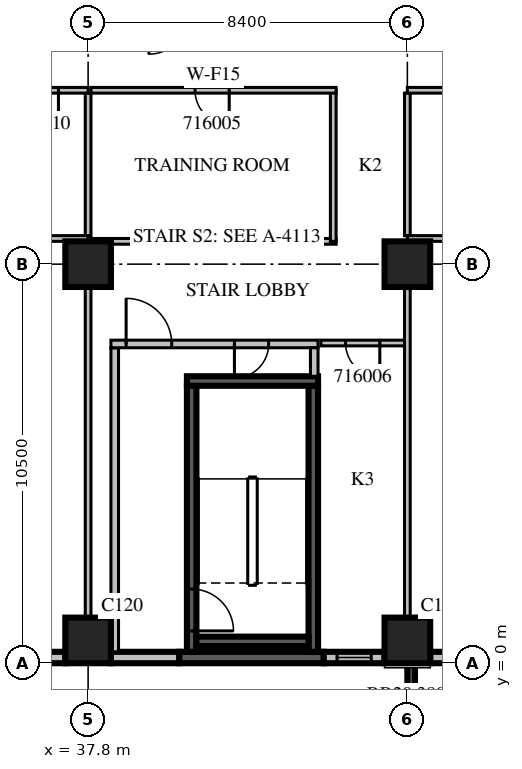
"""IFC4 building model, lengths in metres.
Left out: names, types, materials, properties, quantities, classifications, styles, units other than length and angle.
Written with IfcOpenShell. Run it as: python <this file> out.ifc"""

import sys

from ifc_helpers import new_model, si_unit, direction, frame, frame_2d, origin, origin_2d, place, context, subcontext, project, spatial, rectangle, extrude, source, transform, mapped, element, fill, save


model = new_model("IFC4")
c1 = context("Model", 3, precision=1e-05, world=origin(), true_north=direction((0.0, 1.0)))
c2 = subcontext(c1, "Body", "Model", "MODEL_VIEW")
j1 = project(units=[si_unit("LENGTHUNIT", "METRE"), si_unit("PLANEANGLEUNIT", "RADIAN")], contexts=[c1])
p1 = place(None, origin())
s1 = spatial("IfcSite", under=j1, at=p1, CompositionType="ELEMENT")
p2 = place(p1, origin())
s2 = spatial("IfcBuilding", under=s1, at=p2, CompositionType="ELEMENT")
p3 = place(p2, frame((0.0, 0.0, 78.3)))
s3 = spatial("IfcBuildingStorey", under=s2, at=p3, CompositionType="ELEMENT", Elevation=78.3)
m1 = source(origin(), c2, "Body", "SweptSolid", [
    extrude(rectangle(XDim=1.2, YDim=1.2, at=origin_2d()), origin(), (0.0, 0.0, 1.0), 4.2),
])
for number, where, z_axis, x_axis in (
    (1, (37.8, 0.6, 0.0), (0.0, 0.0, 1.0), (1.0, 0.0, 0.0)),
    (2, (46.2, 0.6, 0.0), (0.0, 0.0, 1.0), (1.0, 0.0, 0.0)),
    (3, (37.8, 10.5, 0.0), (0.0, 0.0, 1.0), (1.0, 0.0, 0.0)),
    (4, (46.2, 10.5, 0.0), (0.0, 0.0, 1.0), (1.0, 0.0, 0.0)),
):
    element("IfcColumn", number, at=place(p3, frame(where, z_axis=z_axis, x_axis=x_axis)), inside=s3, PredefinedType="COLUMN", context=c2, shape_type="MappedRepresentation", body=[
        mapped(m1, transform((0.0, 0.0, 0.0), scale=1.0)),
    ])
m2 = source(origin(), c2, "Body", "SweptSolid", [
    extrude(rectangle(XDim=3.9, YDim=0.2, at=frame_2d((1.95, 0.0))), origin(), (0.0, 0.0, 1.0), 3.8),
])
p4 = place(p3, frame((46.3, 0.0, 0.0), z_axis=(0.0, 0.0, 1.0), x_axis=(0.0, -1.0, 0.0)))
e5 = element("IfcWall", 5, at=p4, inside=s3, PredefinedType="SOLIDWALL", context=c2, shape_type="MappedRepresentation", body=[
    mapped(m2, transform((0.0, 0.0, 0.0), scale=1.0)),
])
m3 = source(origin(), c2, "Body", "SweptSolid", [
    extrude(rectangle(XDim=2.4, YDim=2.7, at=frame_2d((1.2, 1.35))), frame((0.0, 0.11, 0.0), z_axis=(0.0, -1.0, 0.0), x_axis=(1.0, 0.0, 0.0)), (0.0, 0.0, 1.0), 0.22),
])
p5 = place(p4, frame((0.75, 0.0, 0.6)))
e6 = element("IfcOpeningElement", 6, at=p5, cuts=e5, PredefinedType="OPENING", context=c2, shape_type="MappedRepresentation", body=[
    mapped(m3, transform((0.0, 0.0, 0.0), scale=1.0)),
])
m4 = source(origin(), c2, "Body", "SweptSolid", [
    extrude(rectangle(XDim=7.2, YDim=0.3, at=frame_2d((3.6, 0.0))), origin(), (0.0, 0.0, 1.0), 3.8),
])
p6 = place(p3, frame((30.0, 0.15, 0.0), z_axis=(0.0, 0.0, 1.0), x_axis=(1.0, 0.0, 0.0)))
e7 = element("IfcWall", 7, at=p6, inside=s3, PredefinedType="STANDARD", context=c2, shape_type="MappedRepresentation", body=[
    mapped(m4, transform((0.0, 0.0, 0.0), scale=1.0)),
])
m5 = source(origin(), c2, "Body", "SweptSolid", [
    extrude(rectangle(XDim=2.4, YDim=2.7, at=frame_2d((1.2, 1.35))), frame((0.0, 0.16, 0.0), z_axis=(0.0, -1.0, 0.0), x_axis=(1.0, 0.0, 0.0)), (0.0, 0.0, 1.0), 0.32),
])
p7 = place(p6, frame((2.5, 0.0, 0.6)))
e8 = element("IfcOpeningElement", 8, at=p7, cuts=e7, PredefinedType="OPENING", context=c2, shape_type="MappedRepresentation", body=[
    mapped(m5, transform((0.0, 0.0, 0.0), scale=1.0)),
])
m6 = source(origin(), c2, "Body", "SweptSolid", [
    extrude(rectangle(XDim=1.8, YDim=0.3, at=frame_2d((0.9, 0.0))), origin(), (0.0, 0.0, 1.0), 3.8),
])
p8 = place(p3, frame((38.4, 0.15, 0.0), z_axis=(0.0, 0.0, 1.0), x_axis=(1.0, 0.0, 0.0)))
e9 = element("IfcWall", 9, at=p8, inside=s3, PredefinedType="STANDARD", context=c2, shape_type="MappedRepresentation", body=[
    mapped(m6, transform((0.0, 0.0, 0.0), scale=1.0)),
])
m7 = source(origin(), c2, "Body", "SweptSolid", [
    extrude(rectangle(XDim=3.8, YDim=0.3, at=frame_2d((1.9, 0.0))), origin(), (0.0, 0.0, 1.0), 3.8),
])
p9 = place(p3, frame((40.2, 0.15, 0.0), z_axis=(0.0, 0.0, 1.0), x_axis=(1.0, 0.0, 0.0)))
e10 = element("IfcWall", 10, at=p9, inside=s3, PredefinedType="SOLIDWALL", context=c2, shape_type="MappedRepresentation", body=[
    mapped(m7, transform((0.0, 0.0, 0.0), scale=1.0)),
])
m8 = source(origin(), c2, "Body", "SweptSolid", [
    extrude(rectangle(XDim=1.6, YDim=0.3, at=frame_2d((0.8, 0.0))), origin(), (0.0, 0.0, 1.0), 3.8),
])
p10 = place(p3, frame((44.0, 0.15, 0.0), z_axis=(0.0, 0.0, 1.0), x_axis=(1.0, 0.0, 0.0)))
e11 = element("IfcWall", 11, at=p10, inside=s3, PredefinedType="STANDARD", context=c2, shape_type="MappedRepresentation", body=[
    mapped(m8, transform((0.0, 0.0, 0.0), scale=1.0)),
])
m9 = source(origin(), c2, "Body", "SweptSolid", [
    extrude(rectangle(XDim=0.9, YDim=2.7, at=frame_2d((0.45, 1.35))), frame((0.0, 0.16, 0.0), z_axis=(0.0, -1.0, 0.0), x_axis=(1.0, 0.0, 0.0)), (0.0, 0.0, 1.0), 0.32),
])
p11 = place(p10, frame((0.35, 0.0, 0.6)))
e12 = element("IfcOpeningElement", 12, at=p11, cuts=e11, PredefinedType="OPENING", context=c2, shape_type="MappedRepresentation", body=[
    mapped(m9, transform((0.0, 0.0, 0.0), scale=1.0)),
])
m10 = source(origin(), c2, "Body", "SweptSolid", [
    extrude(rectangle(XDim=4.68, YDim=0.3, at=frame_2d((2.34, 0.0))), origin(), (0.0, 0.0, 1.0), 3.8),
])
p12 = place(p3, frame((46.8, 0.15, 0.0), z_axis=(0.0, 0.0, 1.0), x_axis=(1.0, 0.0, 0.0)))
e13 = element("IfcWall", 13, at=p12, inside=s3, PredefinedType="STANDARD", context=c2, shape_type="MappedRepresentation", body=[
    mapped(m10, transform((0.0, 0.0, 0.0), scale=1.0)),
])
m11 = source(origin(), c2, "Body", "SweptSolid", [
    extrude(rectangle(XDim=1.0, YDim=2.1, at=frame_2d((0.5, 1.05))), frame((0.0, 0.16, 0.0), z_axis=(0.0, -1.0, 0.0), x_axis=(1.0, 0.0, 0.0)), (0.0, 0.0, 1.0), 0.32),
])
p13 = place(p12, frame((1.84, 0.0, 0.0)))
e14 = element("IfcOpeningElement", 14, at=p13, cuts=e13, PredefinedType="OPENING", context=c2, shape_type="MappedRepresentation", body=[
    mapped(m11, transform((0.0, 0.0, 0.0), scale=1.0)),
])
m12 = source(origin(), c2, "Body", "SweptSolid", [
    extrude(rectangle(XDim=7.0, YDim=0.25, at=frame_2d((3.5, 0.0))), origin(), (0.0, 0.0, 1.0), 3.8),
])
p14 = place(p3, frame((40.525, 0.3, 0.0), z_axis=(0.0, 0.0, 1.0), x_axis=(0.0, 1.0, 0.0)))
e15 = element("IfcWall", 15, at=p14, inside=s3, PredefinedType="SOLIDWALL", context=c2, shape_type="MappedRepresentation", body=[
    mapped(m12, transform((0.0, 0.0, 0.0), scale=1.0)),
])
m13 = source(origin(), c2, "Body", "SweptSolid", [
    extrude(rectangle(XDim=1.1, YDim=2.1, at=frame_2d((0.55, 1.05))), frame((0.0, 0.135, 0.0), z_axis=(0.0, -1.0, 0.0), x_axis=(1.0, 0.0, 0.0)), (0.0, 0.0, 1.0), 0.27),
])
p15 = place(p14, frame((0.55, 0.0, 0.0)))
e16 = element("IfcOpeningElement", 16, at=p15, cuts=e15, PredefinedType="OPENING", context=c2, shape_type="MappedRepresentation", body=[
    mapped(m13, transform((0.0, 0.0, 0.0), scale=1.0)),
])
p16 = place(p3, frame((43.725, 0.3, 0.0), z_axis=(0.0, 0.0, 1.0), x_axis=(0.0, 1.0, 0.0)))
e17 = element("IfcWall", 17, at=p16, inside=s3, PredefinedType="SOLIDWALL", context=c2, shape_type="MappedRepresentation", body=[
    mapped(m12, transform((0.0, 0.0, 0.0), scale=1.0)),
])
m14 = source(origin(), c2, "Body", "SweptSolid", [
    extrude(rectangle(XDim=3.45, YDim=0.25, at=frame_2d((1.725, 0.0))), origin(), (0.0, 0.0, 1.0), 3.8),
])
p17 = place(p3, frame((40.4, 7.425, 0.0), z_axis=(0.0, 0.0, 1.0), x_axis=(1.0, 0.0, 0.0)))
e18 = element("IfcWall", 18, at=p17, inside=s3, PredefinedType="SOLIDWALL", context=c2, shape_type="MappedRepresentation", body=[
    mapped(m14, transform((0.0, 0.0, 0.0), scale=1.0)),
])
m15 = source(origin(), c2, "Body", "SweptSolid", [
    extrude(rectangle(XDim=2.95, YDim=0.25, at=frame_2d((1.475, 0.0))), origin(), (0.0, 0.0, 1.0), 3.8),
])
p18 = place(p3, frame((40.65, 0.575, 0.0), z_axis=(0.0, 0.0, 1.0), x_axis=(1.0, 0.0, 0.0)))
e19 = element("IfcWall", 19, at=p18, inside=s3, PredefinedType="SOLIDWALL", context=c2, shape_type="MappedRepresentation", body=[
    mapped(m15, transform((0.0, 0.0, 0.0), scale=1.0)),
])
m16 = source(origin(), c2, "Body", "SweptSolid", [
    extrude(rectangle(XDim=8.0, YDim=0.2, at=frame_2d((4.0, 0.0))), origin(), (0.0, 0.0, 1.0), 3.8),
])
p19 = place(p3, frame((38.5, 0.3, 0.0), z_axis=(0.0, 0.0, 1.0), x_axis=(0.0, 1.0, 0.0)))
e20 = element("IfcWall", 20, at=p19, inside=s3, PredefinedType="PARTITIONING", context=c2, shape_type="MappedRepresentation", body=[
    mapped(m16, transform((0.0, 0.0, 0.0), scale=1.0)),
])
m17 = source(origin(), c2, "Body", "SweptSolid", [
    extrude(rectangle(XDim=5.45, YDim=0.2, at=frame_2d((2.725, 0.0))), origin(), (0.0, 0.0, 1.0), 3.8),
])
p20 = place(p3, frame((38.4, 8.4, 0.0), z_axis=(0.0, 0.0, 1.0), x_axis=(1.0, 0.0, 0.0)))
e21 = element("IfcWall", 21, at=p20, inside=s3, PredefinedType="PARTITIONING", context=c2, shape_type="MappedRepresentation", body=[
    mapped(m17, transform((0.0, 0.0, 0.0), scale=1.0)),
])
m18 = source(origin(), c2, "Body", "SweptSolid", [
    extrude(rectangle(XDim=1.2, YDim=2.1, at=frame_2d((0.6, 1.05))), frame((0.0, 0.11, 0.0), z_axis=(0.0, -1.0, 0.0), x_axis=(1.0, 0.0, 0.0)), (0.0, 0.0, 1.0), 0.22),
])
p21 = place(p20, frame((0.4, 0.0, 0.0)))
e22 = element("IfcOpeningElement", 22, at=p21, cuts=e21, PredefinedType="OPENING", context=c2, shape_type="MappedRepresentation", body=[
    mapped(m18, transform((0.0, 0.0, 0.0), scale=1.0)),
])
m19 = source(origin(), c2, "Body", "SweptSolid", [
    extrude(rectangle(XDim=0.9, YDim=2.1, at=frame_2d((0.45, 1.05))), frame((0.0, 0.11, 0.0), z_axis=(0.0, -1.0, 0.0), x_axis=(1.0, 0.0, 0.0)), (0.0, 0.0, 1.0), 0.22),
])
p22 = place(p20, frame((3.25, 0.0, 0.0)))
e23 = element("IfcOpeningElement", 23, at=p22, cuts=e21, PredefinedType="OPENING", context=c2, shape_type="MappedRepresentation", body=[
    mapped(m19, transform((0.0, 0.0, 0.0), scale=1.0)),
])
m20 = source(origin(), c2, "Body", "SweptSolid", [
    extrude(rectangle(XDim=0.75, YDim=0.2, at=frame_2d((0.375, 0.0))), origin(), (0.0, 0.0, 1.0), 3.8),
])
p23 = place(p3, frame((43.75, 7.55, 0.0), z_axis=(0.0, 0.0, 1.0), x_axis=(0.0, 1.0, 0.0)))
e24 = element("IfcWall", 24, at=p23, inside=s3, PredefinedType="PARTITIONING", context=c2, shape_type="MappedRepresentation", body=[
    mapped(m20, transform((0.0, 0.0, 0.0), scale=1.0)),
])
m21 = source(origin(), c2, "Body", "SweptSolid", [
    extrude(rectangle(XDim=6.45, YDim=0.15, at=frame_2d((3.225, 0.0))), origin(), (0.0, 0.0, 1.0), 3.8),
])
p24 = place(p3, frame((37.875, 11.1, 0.0), z_axis=(0.0, 0.0, 1.0), x_axis=(1.0, 0.0, 0.0)))
e25 = element("IfcWall", 25, at=p24, inside=s3, PredefinedType="PARTITIONING", context=c2, shape_type="MappedRepresentation", body=[
    mapped(m21, transform((0.0, 0.0, 0.0), scale=1.0)),
])
m22 = source(origin(), c2, "Body", "SweptSolid", [
    extrude(rectangle(XDim=3.975, YDim=0.15, at=frame_2d((1.988, 0.0))), origin(), (0.0, 0.0, 1.0), 3.8),
])
p25 = place(p3, frame((44.25, 11.1, 0.0), z_axis=(0.0, 0.0, 1.0), x_axis=(0.0, 1.0, 0.0)))
e26 = element("IfcWall", 26, at=p25, inside=s3, PredefinedType="PARTITIONING", context=c2, shape_type="MappedRepresentation", body=[
    mapped(m22, transform((0.0, 0.0, 0.0), scale=1.0)),
])
p26 = place(p3, frame((44.325, 15.075, 0.0), z_axis=(0.0, 0.0, 1.0), x_axis=(-1.0, 0.0, 0.0)))
e27 = element("IfcWall", 27, at=p26, inside=s3, PredefinedType="PARTITIONING", context=c2, shape_type="MappedRepresentation", body=[
    mapped(m21, transform((0.0, 0.0, 0.0), scale=1.0)),
])
m23 = source(origin(), c2, "Body", "SweptSolid", [
    extrude(rectangle(XDim=0.9, YDim=2.1, at=frame_2d((0.45, 1.05))), frame((0.0, 0.085, 0.0), z_axis=(0.0, -1.0, 0.0), x_axis=(1.0, 0.0, 0.0)), (0.0, 0.0, 1.0), 0.17),
])
p27 = place(p26, frame((2.812, 0.0, 0.0)))
e28 = element("IfcOpeningElement", 28, at=p27, cuts=e27, PredefinedType="OPENING", context=c2, shape_type="MappedRepresentation", body=[
    mapped(m23, transform((0.0, 0.0, 0.0), scale=1.0)),
])
m24 = source(origin(), c2, "Body", "SweptSolid", [
    extrude(rectangle(XDim=2.2, YDim=0.15, at=frame_2d((1.1, 0.0))), origin(), (0.0, 0.0, 1.0), 3.8),
])
p28 = place(p3, frame((46.125, 8.425, 0.0), z_axis=(0.0, 0.0, 1.0), x_axis=(-1.0, 0.0, 0.0)))
e29 = element("IfcWall", 29, at=p28, inside=s3, PredefinedType="PARTITIONING", context=c2, shape_type="MappedRepresentation", body=[
    mapped(m24, transform((0.0, 0.0, 0.0), scale=1.0)),
])
p29 = place(p28, frame((0.65, 0.0, 0.0)))
e30 = element("IfcOpeningElement", 30, at=p29, cuts=e29, PredefinedType="OPENING", context=c2, shape_type="MappedRepresentation", body=[
    mapped(m23, transform((0.0, 0.0, 0.0), scale=1.0)),
])
m25 = source(origin(), c2, "Body", "SweptSolid", [
    extrude(rectangle(XDim=8.702, YDim=0.15, at=frame_2d((4.351, 0.0))), origin(), (0.0, 0.0, 1.0), 3.8),
])
p30 = place(p3, frame((37.8, 1.199, 0.0), z_axis=(0.0, 0.0, 1.0), x_axis=(0.0, 1.0, 0.0)))
e31 = element("IfcWall", 31, at=p30, inside=s3, PredefinedType="PARTITIONING", context=c2, shape_type="MappedRepresentation", body=[
    mapped(m25, transform((0.0, 0.0, 0.0), scale=1.0)),
])
m26 = source(origin(), c2, "Body", "SweptSolid", [
    extrude(rectangle(XDim=3.75, YDim=0.15, at=frame_2d((1.875, 0.0))), origin(), (0.0, 0.0, 1.0), 3.8),
])
p31 = place(p3, frame((37.8, 11.25, 0.0), z_axis=(0.0, 0.0, 1.0), x_axis=(0.0, 1.0, 0.0)))
e32 = element("IfcWall", 32, at=p31, inside=s3, PredefinedType="PARTITIONING", context=c2, shape_type="MappedRepresentation", body=[
    mapped(m26, transform((0.0, 0.0, 0.0), scale=1.0)),
])
m27 = source(origin(), c2, "Body", "SweptSolid", [
    extrude(rectangle(XDim=8.4, YDim=0.15, at=frame_2d((4.2, 0.0))), origin(), (0.0, 0.0, 1.0), 3.8),
])
p32 = place(p3, frame((37.8, 11.175, 0.0), z_axis=(0.0, 0.0, 1.0), x_axis=(-1.0, 0.0, 0.0)))
e33 = element("IfcWall", 33, at=p32, inside=s3, PredefinedType="PARTITIONING", context=c2, shape_type="MappedRepresentation", body=[
    mapped(m27, transform((0.0, 0.0, 0.0), scale=1.0)),
])
m28 = source(origin(), c2, "Body", "SweptSolid", [
    extrude(rectangle(XDim=1.1, YDim=2.1, at=frame_2d((0.55, 1.05))), frame((0.0, 0.085, 0.0), z_axis=(0.0, -1.0, 0.0), x_axis=(1.0, 0.0, 0.0)), (0.0, 0.0, 1.0), 0.17),
])
p33 = place(p32, frame((5.833, 0.0, 0.0)))
e34 = element("IfcOpeningElement", 34, at=p33, cuts=e33, PredefinedType="OPENING", context=c2, shape_type="MappedRepresentation", body=[
    mapped(m28, transform((0.0, 0.0, 0.0), scale=1.0)),
])
p34 = place(p3, frame((46.2, 1.199, 0.0), z_axis=(0.0, 0.0, 1.0), x_axis=(0.0, 1.0, 0.0)))
e35 = element("IfcWall", 35, at=p34, inside=s3, PredefinedType="PARTITIONING", context=c2, shape_type="MappedRepresentation", body=[
    mapped(m25, transform((0.0, 0.0, 0.0), scale=1.0)),
])
p35 = place(p3, frame((46.2, 11.25, 0.0), z_axis=(0.0, 0.0, 1.0), x_axis=(0.0, 1.0, 0.0)))
e36 = element("IfcWall", 36, at=p35, inside=s3, PredefinedType="PARTITIONING", context=c2, shape_type="MappedRepresentation", body=[
    mapped(m26, transform((0.0, 0.0, 0.0), scale=1.0)),
])
m29 = source(origin(), c2, "Body", "SweptSolid", [
    extrude(rectangle(XDim=24.9, YDim=0.15, at=frame_2d((12.45, 0.0))), origin(), (0.0, 0.0, 1.0), 3.8),
])
p36 = place(p3, frame((71.1, 11.175, 0.0), z_axis=(0.0, 0.0, 1.0), x_axis=(-1.0, 0.0, 0.0)))
e37 = element("IfcWall", 37, at=p36, inside=s3, PredefinedType="PARTITIONING", context=c2, shape_type="MappedRepresentation", body=[
    mapped(m29, transform((0.0, 0.0, 0.0), scale=1.0)),
])
p37 = place(p36, frame((22.332, 0.0, 0.0)))
e38 = element("IfcOpeningElement", 38, at=p37, cuts=e37, PredefinedType="OPENING", context=c2, shape_type="MappedRepresentation", body=[
    mapped(m28, transform((0.0, 0.0, 0.0), scale=1.0)),
])
p38 = place(p36, frame((4.607, 0.0, 0.0)))
e39 = element("IfcOpeningElement", 39, at=p38, cuts=e37, PredefinedType="OPENING", context=c2, shape_type="MappedRepresentation", body=[
    mapped(m23, transform((0.0, 0.0, 0.0), scale=1.0)),
])
p39 = place(p36, frame((2.243, 0.0, 0.0)))
e40 = element("IfcOpeningElement", 40, at=p39, cuts=e37, PredefinedType="OPENING", context=c2, shape_type="MappedRepresentation", body=[
    mapped(m23, transform((0.0, 0.0, 0.0), scale=1.0)),
])
p40 = place(p3, frame((37.8, 15.075, 0.0), z_axis=(0.0, 0.0, 1.0), x_axis=(-1.0, 0.0, 0.0)))
e41 = element("IfcWall", 41, at=p40, inside=s3, PredefinedType="PARTITIONING", context=c2, shape_type="MappedRepresentation", body=[
    mapped(m27, transform((0.0, 0.0, 0.0), scale=1.0)),
])
p41 = place(p40, frame((6.146, 0.0, 0.0)))
e42 = element("IfcOpeningElement", 42, at=p41, cuts=e41, PredefinedType="OPENING", context=c2, shape_type="MappedRepresentation", body=[
    mapped(m28, transform((0.0, 0.0, 0.0), scale=1.0)),
])
p42 = place(p40, frame((3.276, 0.0, 0.0)))
e43 = element("IfcOpeningElement", 43, at=p42, cuts=e41, PredefinedType="OPENING", context=c2, shape_type="MappedRepresentation", body=[
    mapped(m23, transform((0.0, 0.0, 0.0), scale=1.0)),
])
p43 = place(p40, frame((0.781, 0.0, 0.0)))
e44 = element("IfcOpeningElement", 44, at=p43, cuts=e41, PredefinedType="OPENING", context=c2, shape_type="MappedRepresentation", body=[
    mapped(m23, transform((0.0, 0.0, 0.0), scale=1.0)),
])
p44 = place(p3, frame((71.1, 15.075, 0.0), z_axis=(0.0, 0.0, 1.0), x_axis=(-1.0, 0.0, 0.0)))
e45 = element("IfcWall", 45, at=p44, inside=s3, PredefinedType="PARTITIONING", context=c2, shape_type="MappedRepresentation", body=[
    mapped(m29, transform((0.0, 0.0, 0.0), scale=1.0)),
])
p45 = place(p44, frame((22.644, 0.0, 0.0)))
e46 = element("IfcOpeningElement", 46, at=p45, cuts=e45, PredefinedType="OPENING", context=c2, shape_type="MappedRepresentation", body=[
    mapped(m28, transform((0.0, 0.0, 0.0), scale=1.0)),
])
p46 = place(p44, frame((19.804, 0.0, 0.0)))
e47 = element("IfcOpeningElement", 47, at=p46, cuts=e45, PredefinedType="OPENING", context=c2, shape_type="MappedRepresentation", body=[
    mapped(m23, transform((0.0, 0.0, 0.0), scale=1.0)),
])
p47 = place(p44, frame((15.529, 0.0, 0.0)))
e48 = element("IfcOpeningElement", 48, at=p47, cuts=e45, PredefinedType="OPENING", context=c2, shape_type="MappedRepresentation", body=[
    mapped(m23, transform((0.0, 0.0, 0.0), scale=1.0)),
])
p48 = place(p44, frame((10.838, 0.0, 0.0)))
e49 = element("IfcOpeningElement", 49, at=p48, cuts=e45, PredefinedType="OPENING", context=c2, shape_type="MappedRepresentation", body=[
    mapped(m23, transform((0.0, 0.0, 0.0), scale=1.0)),
])
p49 = place(p44, frame((7.999, 0.0, 0.0)))
e50 = element("IfcOpeningElement", 50, at=p49, cuts=e45, PredefinedType="OPENING", context=c2, shape_type="MappedRepresentation", body=[
    mapped(m23, transform((0.0, 0.0, 0.0), scale=1.0)),
])
m30 = source(origin(), c2, "Body", "SweptSolid", [
    extrude(rectangle(XDim=1.2, YDim=2.1, at=frame_2d((0.6, 1.05))), frame((0.0, 0.085, 0.0), z_axis=(0.0, -1.0, 0.0), x_axis=(1.0, 0.0, 0.0)), (0.0, 0.0, 1.0), 0.17),
])
p50 = place(p44, frame((2.993, 0.0, 0.0)))
e51 = element("IfcOpeningElement", 51, at=p50, cuts=e45, PredefinedType="OPENING", context=c2, shape_type="MappedRepresentation", body=[
    mapped(m30, transform((0.0, 0.0, 0.0), scale=1.0)),
])
m31 = source(origin(), c2, "Body", "SweptSolid", [
    extrude(rectangle(XDim=0.9, YDim=2.7, at=frame_2d((0.45, 1.35))), frame((0.0, 0.03, 0.0), z_axis=(0.0, -1.0, 0.0), x_axis=(1.0, 0.0, 0.0)), (0.0, 0.0, 1.0), 0.06),
])
p51 = place(p11, origin())
e52 = element("IfcWindow", 52, at=p51, inside=s3, PartitioningType="SINGLE_PANEL", PredefinedType="WINDOW", context=c2, shape_type="MappedRepresentation", body=[
    mapped(m31, transform((0.0, 0.0, 0.0), scale=1.0)),
])
fill(e12, e52)
m32 = source(origin(), c2, "Body", "SweptSolid", [
    extrude(rectangle(XDim=1.1, YDim=2.1, at=frame_2d((0.55, 1.05))), frame((0.0, 0.025, 0.0), z_axis=(0.0, -1.0, 0.0), x_axis=(1.0, 0.0, 0.0)), (0.0, 0.0, 1.0), 0.05),
])
p52 = place(p15, origin())
e53 = element("IfcDoor", 53, at=p52, inside=s3, OperationType="SINGLE_SWING_RIGHT", PredefinedType="DOOR", context=c2, shape_type="MappedRepresentation", body=[
    mapped(m32, transform((0.0, 0.0, 0.0), scale=1.0)),
])
fill(e16, e53)
m33 = source(origin(), c2, "Body", "SweptSolid", [
    extrude(rectangle(XDim=1.2, YDim=2.1, at=frame_2d((0.6, 1.05))), frame((0.0, 0.025, 0.0), z_axis=(0.0, -1.0, 0.0), x_axis=(1.0, 0.0, 0.0)), (0.0, 0.0, 1.0), 0.05),
])
p53 = place(p21, origin())
e54 = element("IfcDoor", 54, at=p53, inside=s3, OperationType="SINGLE_SWING_LEFT", PredefinedType="DOOR", context=c2, shape_type="MappedRepresentation", body=[
    mapped(m33, transform((0.0, 0.0, 0.0), scale=1.0)),
])
fill(e22, e54)
m34 = source(origin(), c2, "Body", "SweptSolid", [
    extrude(rectangle(XDim=0.9, YDim=2.1, at=frame_2d((0.45, 1.05))), frame((0.0, 0.025, 0.0), z_axis=(0.0, -1.0, 0.0), x_axis=(1.0, 0.0, 0.0)), (0.0, 0.0, 1.0), 0.05),
])
p54 = place(p22, origin())
e55 = element("IfcDoor", 55, at=p54, inside=s3, OperationType="SINGLE_SWING_RIGHT", PredefinedType="DOOR", context=c2, shape_type="MappedRepresentation", body=[
    mapped(m34, transform((0.0, 0.0, 0.0), scale=1.0)),
])
fill(e23, e55)
p55 = place(p27, origin())
e56 = element("IfcDoor", 56, at=p55, inside=s3, OperationType="SINGLE_SWING_LEFT", PredefinedType="DOOR", context=c2, shape_type="MappedRepresentation", body=[
    mapped(m34, transform((0.0, 0.0, 0.0), scale=1.0)),
])
fill(e28, e56)
p56 = place(p29, origin())
e57 = element("IfcDoor", 57, at=p56, inside=s3, OperationType="SINGLE_SWING_LEFT", PredefinedType="DOOR", context=c2, shape_type="MappedRepresentation", body=[
    mapped(m34, transform((0.0, 0.0, 0.0), scale=1.0)),
])
fill(e30, e57)
p57 = place(p43, origin())
e58 = element("IfcDoor", 58, at=p57, inside=s3, OperationType="SINGLE_SWING_LEFT", PredefinedType="DOOR", context=c2, shape_type="MappedRepresentation", body=[
    mapped(m34, transform((0.0, 0.0, 0.0), scale=1.0)),
])
fill(e44, e58)
save(model, sys.argv[1])
